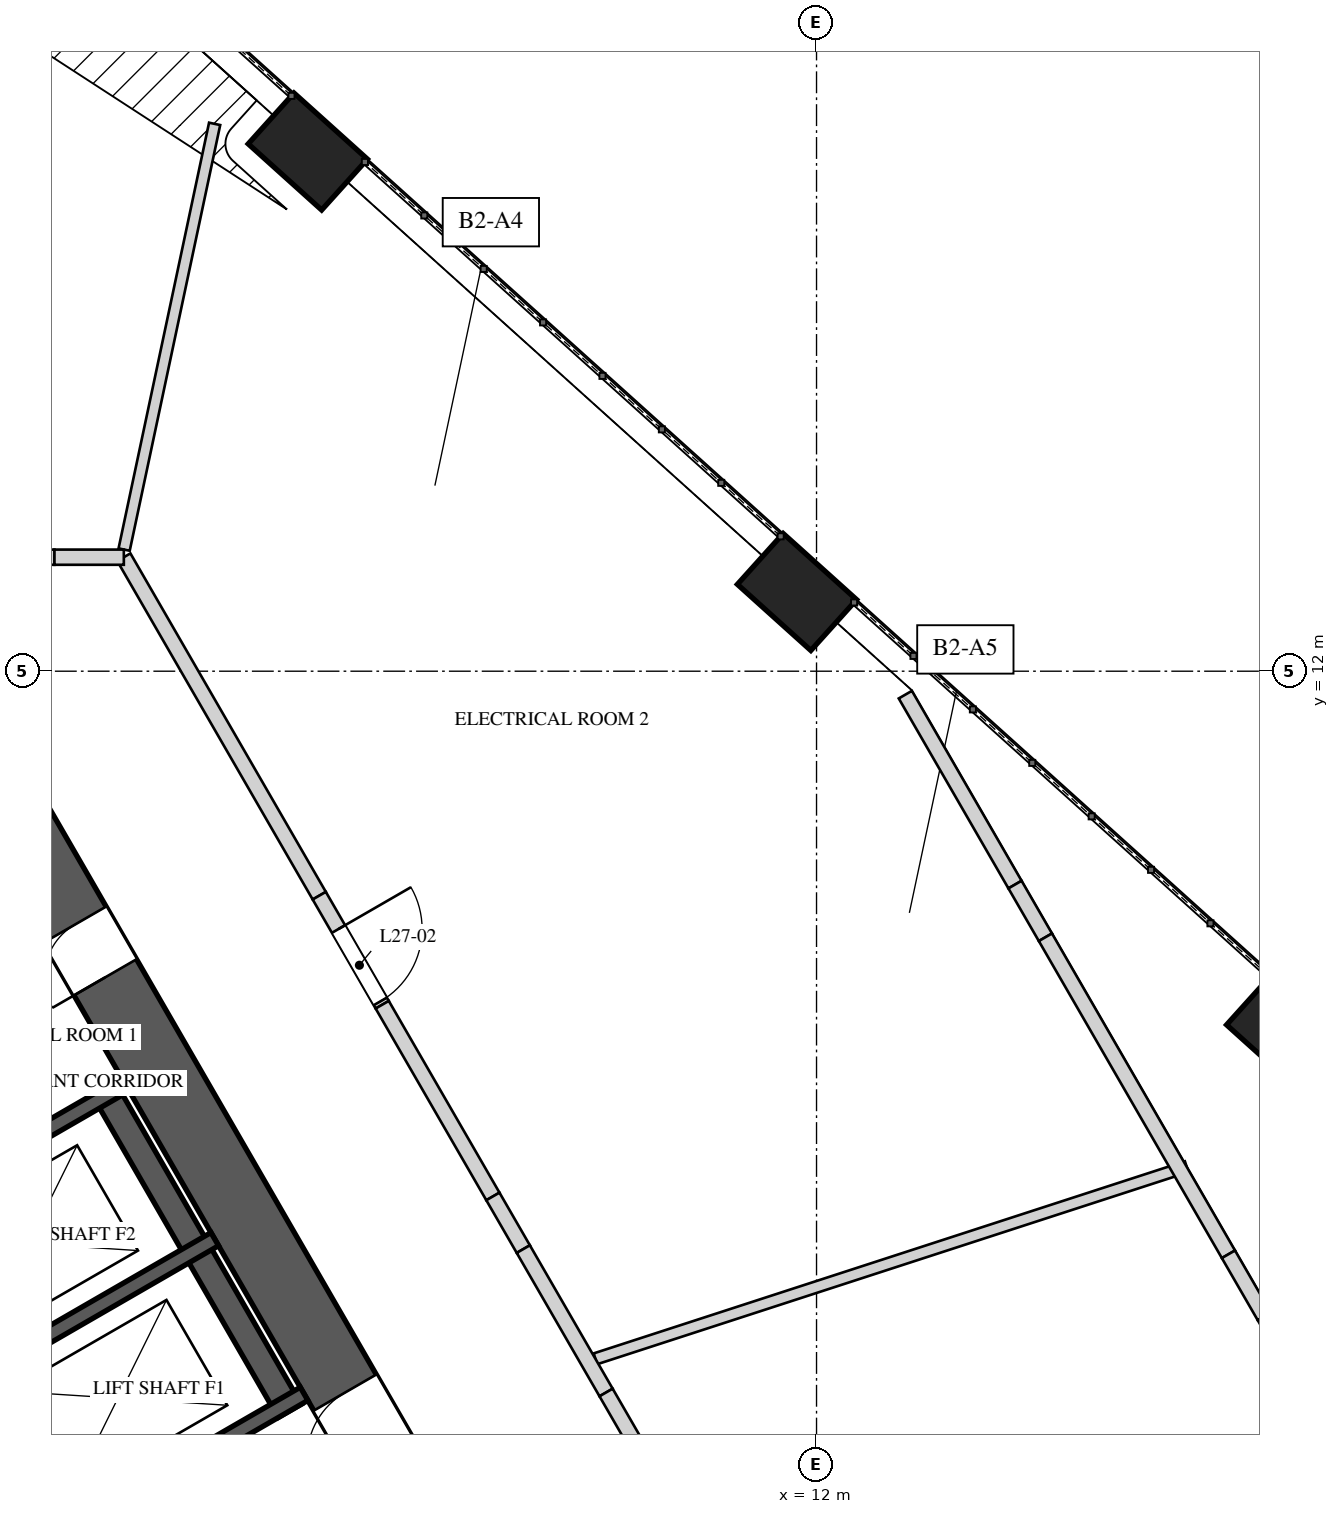
"""IFC4 building model, lengths in metres.
Left out: names, types, materials, properties, quantities, classifications, styles, units other than length and angle.
Written with IfcOpenShell. Run it as: python <this file> out.ifc"""

import sys

from ifc_helpers import new_model, si_unit, direction, frame, frame_2d, origin, origin_2d, place, context, subcontext, project, spatial, polyline, rectangle, outline, extrude, element, fill, save


model = new_model("IFC4")
c1 = context("Model", 3, precision=1e-05, world=origin(), true_north=direction((0.0, 1.0)))
c2 = subcontext(c1, "Body", "Model", "MODEL_VIEW")
j1 = project(units=[si_unit("LENGTHUNIT", "METRE"), si_unit("PLANEANGLEUNIT", "RADIAN")], contexts=[c1])
p1 = place(None, origin())
s1 = spatial("IfcSite", under=j1, at=p1, CompositionType="ELEMENT")
p2 = place(p1, origin())
s2 = spatial("IfcBuilding", under=s1, at=p2, CompositionType="ELEMENT")
p3 = place(p2, frame((0.0, 0.0, 120.4)))
s3 = spatial("IfcBuildingStorey", under=s2, at=p3, CompositionType="ELEMENT", Elevation=120.4)
p4 = place(p3, frame((9.699, -4.25, 0.0), z_axis=(0.0, 0.0, 1.0), x_axis=(-0.499999102847, 0.866025921755, 0.0)))
e1 = element("IfcWall", 1, at=p4, inside=s3, PredefinedType="SHEAR", context=c2, shape_type="SweptSolid", body=[
    extrude(rectangle(XDim=17.061, YDim=0.95, at=frame_2d((8.53, 0.0))), origin(), (0.0, 0.0, 1.0), 5.2),
])
p5 = place(p4, frame((6.805, 0.0, 0.0)))
e2 = element("IfcOpeningElement", 2, at=p5, cuts=e1, PredefinedType="OPENING", context=c2, shape_type="SweptSolid", body=[
    extrude(rectangle(XDim=1.0, YDim=2.4, at=frame_2d((0.5, 1.2))), frame((0.0, 0.485, 0.0), z_axis=(0.0, -1.0, 0.0), x_axis=(1.0, 0.0, 0.0)), (0.0, 0.0, 1.0), 0.97),
])
p6 = place(p4, frame((14.114, 0.0, 0.0)))
e3 = element("IfcOpeningElement", 3, at=p6, cuts=e1, PredefinedType="OPENING", context=c2, shape_type="SweptSolid", body=[
    extrude(rectangle(XDim=0.8, YDim=2.1, at=frame_2d((0.4, 1.05))), frame((0.0, 0.485, 0.0), z_axis=(0.0, -1.0, 0.0), x_axis=(1.0, 0.0, 0.0)), (0.0, 0.0, 1.0), 0.97),
])
for number, where, z_axis, x_axis in (
    (4, (18.179, 7.247, 0.0), (0.0, 0.0, 1.0), (-0.743, 0.669, 0.0)),
    (5, (11.743, 13.042, 0.0), (0.0, 0.0, 1.0), (-0.743, 0.669, 0.0)),
    (6, (5.307, 18.837, 0.0), (0.0, 0.0, 1.0), (-0.743, 0.669, 0.0)),
):
    element("IfcColumn", number, at=place(p3, frame(where, z_axis=z_axis, x_axis=x_axis)), inside=s3, PredefinedType="COLUMN", context=c2, shape_type="SweptSolid", body=[
        extrude(rectangle(XDim=1.3, YDim=0.9, at=origin_2d()), origin(), (0.0, 0.0, 1.0), 2.864),
    ])
p7 = place(p3, frame((2.19, 0.606, 0.0), z_axis=(0.0, 0.0, 1.0), x_axis=(-0.500002801628, 0.866023786258, 0.0)))
e7 = element("IfcWall", 7, at=p7, inside=s3, PredefinedType="SOLIDWALL", context=c2, shape_type="SweptSolid", body=[
    extrude(rectangle(XDim=4.9, YDim=0.2, at=frame_2d((2.45, 0.0))), origin(), (0.0, 0.0, 1.0), 4.85),
])
p8 = place(p7, frame((0.625, 0.0, 0.0)))
e8 = element("IfcOpeningElement", 8, at=p8, cuts=e7, PredefinedType="OPENING", context=c2, shape_type="SweptSolid", body=[
    extrude(rectangle(XDim=1.3, YDim=2.1, at=frame_2d((0.65, 1.05))), frame((0.0, 0.11, 0.0), z_axis=(0.0, -1.0, 0.0), x_axis=(1.0, 0.0, 0.0)), (0.0, 0.0, 1.0), 0.22),
])
p9 = place(p7, frame((2.975, 0.0, 0.0)))
e9 = element("IfcOpeningElement", 9, at=p9, cuts=e7, PredefinedType="OPENING", context=c2, shape_type="SweptSolid", body=[
    extrude(rectangle(XDim=1.3, YDim=2.1, at=frame_2d((0.65, 1.05))), frame((0.0, 0.11, 0.0), z_axis=(0.0, -1.0, 0.0), x_axis=(1.0, 0.0, 0.0)), (0.0, 0.0, 1.0), 0.22),
])
p10 = place(p3, frame((5.07, 2.269, 0.0), z_axis=(0.0, 0.0, 1.0), x_axis=(-0.49998122708, 0.866036242063, 0.0)))
e10 = element("IfcWall", 10, at=p10, inside=s3, PredefinedType="SOLIDWALL", context=c2, shape_type="SweptSolid", body=[
    extrude(rectangle(XDim=4.9, YDim=0.35, at=frame_2d((2.45, 0.0))), origin(), (0.0, 0.0, 1.0), 4.85),
])
for number, where, z_axis, x_axis in (
    (11, (2.227, 0.743, 0.0), (0.0, 0.0, 1.0), (0.866, 0.5, 0.0)),
    (12, (1.052, 2.778, 0.0), (0.0, 0.0, 1.0), (0.866, 0.5, 0.0)),
):
    element("IfcWall", number, at=place(p3, frame(where, z_axis=z_axis, x_axis=x_axis)), inside=s3, PredefinedType="SOLIDWALL", context=c2, shape_type="SweptSolid", body=[
        extrude(rectangle(XDim=3.5, YDim=0.2, at=frame_2d((1.75, 0.0))), origin(), (0.0, 0.0, 1.0), 4.85),
    ])
p11 = place(p3, frame((-0.123, 4.813, 0.0), z_axis=(0.0, 0.0, 1.0), x_axis=(0.866019471182, 0.500010275428, 0.0)))
e13 = element("IfcWall", 13, at=p11, inside=s3, PredefinedType="SOLIDWALL", context=c2, shape_type="SweptSolid", body=[
    extrude(rectangle(XDim=3.5, YDim=0.2, at=frame_2d((1.75, 0.0))), origin(), (0.0, 0.0, 1.0), 4.85),
])
p12 = place(p3, frame((2.891, 13.6, 0.0), z_axis=(0.0, 0.0, 1.0), x_axis=(0.207901080915, 0.978149855878, 0.0)))
e14 = element("IfcWall", 14, at=p12, inside=s3, PredefinedType="PARTITIONING", context=c2, shape_type="SweptSolid", body=[
    extrude(rectangle(XDim=5.726, YDim=0.15, at=frame_2d((2.863, 0.0))), origin(), (0.0, 0.0, 1.0), 4.85),
])
p13 = place(p3, frame((9.091, 2.954, 0.0), z_axis=(0.0, 0.0, 1.0), x_axis=(0.951056003265, 0.309018573315, 0.0)))
e15 = element("IfcWall", 15, at=p13, inside=s3, PredefinedType="PARTITIONING", context=c2, shape_type="SweptSolid", body=[
    extrude(rectangle(XDim=8.179, YDim=0.15, at=frame_2d((4.089, 0.0))), origin(), (0.0, 0.0, 1.0), 4.85),
])
p14 = place(p3, frame((2.887, 13.5, 0.0), z_axis=(0.0, 0.0, 1.0), x_axis=(0.50000466804, -0.866022708674, 0.0)))
e16 = element("IfcWall", 16, at=p14, inside=s3, PredefinedType="SOLIDWALL", context=c2, shape_type="SweptSolid", body=[
    extrude(rectangle(XDim=5.142, YDim=0.2, at=frame_2d((2.571, 0.0))), origin(), (0.0, 0.0, 1.0), 4.85),
])
p15 = place(p3, frame((5.458, 9.047, 0.0), z_axis=(0.0, 0.0, 1.0), x_axis=(0.500054140411, -0.865994143547, 0.0)))
e17 = element("IfcWall", 17, at=p15, inside=s3, PredefinedType="SOLIDWALL", context=c2, shape_type="SweptSolid", body=[
    extrude(outline(polyline([(0.0, 0.0), (1.656, 0.0), (1.656, 4.85), (0.786, 4.85), (0.786, 4.15), (0.0, 4.15), (0.0, 0.0)])), frame((0.0, 0.1, 0.0), z_axis=(0.0, -1.0, 0.0), x_axis=(1.0, 0.0, 0.0)), (0.0, 0.0, 1.0), 0.2),
])
p16 = place(p15, frame((0.507, 0.0, 0.0)))
e18 = element("IfcOpeningElement", 18, at=p16, cuts=e17, PredefinedType="OPENING", context=c2, shape_type="SweptSolid", body=[
    extrude(rectangle(XDim=1.1, YDim=2.2, at=frame_2d((0.55, 1.1))), frame((0.0, 0.11, 0.0), z_axis=(0.0, -1.0, 0.0), x_axis=(1.0, 0.0, 0.0)), (0.0, 0.0, 1.0), 0.22),
])
p17 = place(p3, frame((6.286, 7.612, 0.0), z_axis=(0.0, 0.0, 1.0), x_axis=(0.499961921997, -0.866047387014, 0.0)))
e19 = element("IfcWall", 19, at=p17, inside=s3, PredefinedType="SOLIDWALL", context=c2, shape_type="SweptSolid", body=[
    extrude(rectangle(XDim=2.912, YDim=0.2, at=frame_2d((1.456, 0.0))), origin(), (0.0, 0.0, 1.0), 4.85),
])
p18 = place(p3, frame((7.742, 5.09, 0.0), z_axis=(0.0, 0.0, 1.0), x_axis=(0.500109828528, -0.865961984968, 0.0)))
e20 = element("IfcWall", 20, at=p18, inside=s3, PredefinedType="SOLIDWALL", context=c2, shape_type="SweptSolid", body=[
    extrude(rectangle(XDim=0.8, YDim=0.2, at=frame_2d((0.4, 0.0))), origin(), (0.0, 0.0, 1.0), 3.95),
])
p19 = place(p3, frame((8.142, 4.397, 0.0), z_axis=(0.0, 0.0, 1.0), x_axis=(0.499948868167, -0.866054922749, 0.0)))
e21 = element("IfcWall", 21, at=p19, inside=s3, PredefinedType="SOLIDWALL", context=c2, shape_type="SweptSolid", body=[
    extrude(rectangle(XDim=2.178, YDim=0.2, at=frame_2d((1.089, 0.0))), origin(), (0.0, 0.0, 1.0), 4.85),
])
p20 = place(p3, frame((9.231, 2.511, 0.0), z_axis=(0.0, 0.0, 1.0), x_axis=(0.500118100521, -0.865957207679, 0.0)))
e22 = element("IfcWall", 22, at=p20, inside=s3, PredefinedType="SOLIDWALL", context=c2, shape_type="SweptSolid", body=[
    extrude(rectangle(XDim=0.944, YDim=0.2, at=frame_2d((0.472, 0.0))), origin(), (0.0, 0.0, 1.0), 3.75),
])
p21 = place(p3, frame((1.269, 13.5, 0.0), z_axis=(0.0, 0.0, 1.0), x_axis=(1.0, 0.0, 0.0)))
e23 = element("IfcWall", 23, at=p21, inside=s3, PredefinedType="SOLIDWALL", context=c2, shape_type="SweptSolid", body=[
    extrude(rectangle(XDim=0.705, YDim=0.2, at=frame_2d((0.353, 0.0))), origin(), (0.0, 0.0, 1.0), 4.15),
])
p22 = place(p3, frame((1.974, 13.5, 0.0), z_axis=(0.0, 0.0, 1.0), x_axis=(1.0, 0.0, 0.0)))
e24 = element("IfcWall", 24, at=p22, inside=s3, PredefinedType="SOLIDWALL", context=c2, shape_type="SweptSolid", body=[
    extrude(rectangle(XDim=0.913, YDim=0.2, at=frame_2d((0.457, 0.0))), origin(), (0.0, 0.0, 1.0), 4.85),
])
p23 = place(p3, frame((13.168, 11.692, 0.0), z_axis=(0.0, 0.0, 1.0), x_axis=(0.499988576638, -0.866031998965, 0.0)))
e25 = element("IfcWall", 25, at=p23, inside=s3, PredefinedType="SOLIDWALL", context=c2, shape_type="SweptSolid", body=[
    extrude(rectangle(XDim=2.885, YDim=0.2, at=frame_2d((1.443, 0.0))), origin(), (0.0, 0.0, 1.0), 4.85),
])
p24 = place(p3, frame((14.611, 9.193, 0.0), z_axis=(0.0, 0.0, 1.0), x_axis=(0.500109828528, -0.865961984968, 0.0)))
e26 = element("IfcWall", 26, at=p24, inside=s3, PredefinedType="SOLIDWALL", context=c2, shape_type="SweptSolid", body=[
    extrude(rectangle(XDim=0.8, YDim=0.2, at=frame_2d((0.4, 0.0))), origin(), (0.0, 0.0, 1.0), 3.95),
])
p25 = place(p3, frame((15.011, 8.5, 0.0), z_axis=(0.0, 0.0, 1.0), x_axis=(0.499982815096, -0.866035325266, 0.0)))
e27 = element("IfcWall", 27, at=p25, inside=s3, PredefinedType="SOLIDWALL", context=c2, shape_type="SweptSolid", body=[
    extrude(rectangle(XDim=4.816, YDim=0.2, at=frame_2d((2.408, 0.0))), origin(), (0.0, 0.0, 1.0), 4.85),
])
p26 = place(p3, frame((17.419, 4.329, 0.0), z_axis=(0.0, 0.0, 1.0), x_axis=(0.499924048634, -0.866069249885, 0.0)))
e28 = element("IfcWall", 28, at=p26, inside=s3, PredefinedType="SOLIDWALL", context=c2, shape_type="SweptSolid", body=[
    extrude(rectangle(XDim=0.944, YDim=0.2, at=frame_2d((0.472, 0.0))), origin(), (0.0, 0.0, 1.0), 3.75),
])
p27 = place(p3, frame((17.891, 3.512, 0.0), z_axis=(0.0, 0.0, 1.0), x_axis=(0.500006187924, -0.866021831155, 0.0)))
e29 = element("IfcWall", 29, at=p27, inside=s3, PredefinedType="SOLIDWALL", context=c2, shape_type="SweptSolid", body=[
    extrude(rectangle(XDim=8.963, YDim=0.2, at=frame_2d((4.481, 0.0))), origin(), (0.0, 0.0, 1.0), 4.85),
])
p28 = place(p5, origin())
e30 = element("IfcDoor", 30, at=p28, inside=s3, OperationType="SINGLE_SWING_RIGHT", PredefinedType="DOOR", context=c2, shape_type="SweptSolid", body=[
    extrude(rectangle(XDim=1.0, YDim=2.4, at=frame_2d((0.5, 1.2))), frame((0.0, 0.025, 0.0), z_axis=(0.0, -1.0, 0.0), x_axis=(1.0, 0.0, 0.0)), (0.0, 0.0, 1.0), 0.05),
])
fill(e2, e30)
p29 = place(p6, origin())
e31 = element("IfcDoor", 31, at=p29, inside=s3, OperationType="SINGLE_SWING_RIGHT", PredefinedType="DOOR", context=c2, shape_type="SweptSolid", body=[
    extrude(rectangle(XDim=0.8, YDim=2.1, at=frame_2d((0.4, 1.05))), frame((0.0, 0.025, 0.0), z_axis=(0.0, -1.0, 0.0), x_axis=(1.0, 0.0, 0.0)), (0.0, 0.0, 1.0), 0.05),
])
fill(e3, e31)
p30 = place(p16, origin())
e32 = element("IfcDoor", 32, at=p30, inside=s3, OperationType="SINGLE_SWING_RIGHT", PredefinedType="DOOR", context=c2, shape_type="SweptSolid", body=[
    extrude(rectangle(XDim=1.1, YDim=2.2, at=frame_2d((0.55, 1.1))), frame((0.0, 0.025, 0.0), z_axis=(0.0, -1.0, 0.0), x_axis=(1.0, 0.0, 0.0)), (0.0, 0.0, 1.0), 0.05),
])
fill(e18, e32)
save(model, sys.argv[1])
